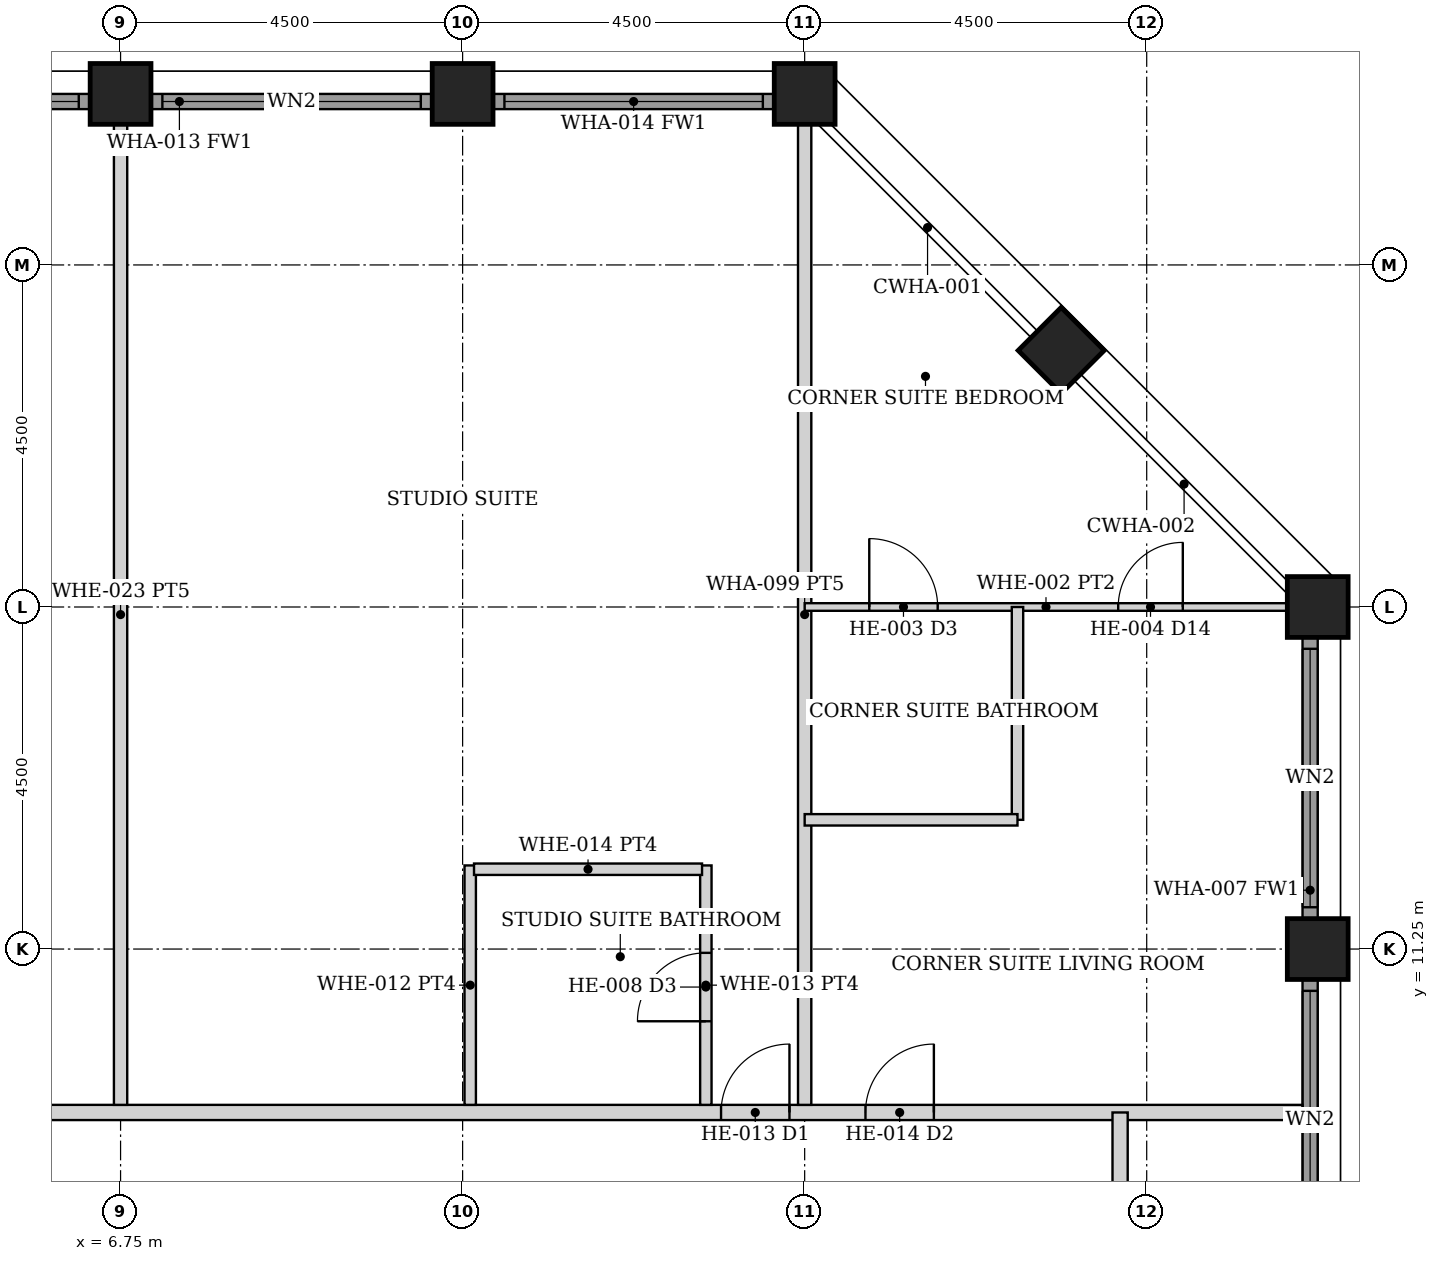
"""IFC4 building model, lengths in metres.
Left out: names, types, materials, properties, quantities, classifications, styles, units other than length and angle.
Written with IfcOpenShell. Run it as: python <this file> out.ifc"""

import sys

from ifc_helpers import new_model, si_unit, direction, frame, frame_2d, origin, origin_2d, place, context, subcontext, project, spatial, rectangle, hollow_rectangle, extrude, element, fill, save


model = new_model("IFC4")
c1 = context("Model", 3, precision=1e-05, world=origin(), true_north=direction((0.0, 1.0)))
c2 = subcontext(c1, "Body", "Model", "MODEL_VIEW")
j1 = project(units=[si_unit("LENGTHUNIT", "METRE"), si_unit("PLANEANGLEUNIT", "RADIAN")], contexts=[c1])
p1 = place(None, origin())
s1 = spatial("IfcSite", under=j1, at=p1, CompositionType="ELEMENT")
p2 = place(p1, origin())
s2 = spatial("IfcBuilding", under=s1, at=p2, CompositionType="ELEMENT")
p3 = place(p2, frame((0.0, 0.0, 161.6)))
s3 = spatial("IfcBuildingStorey", under=s2, at=p3, CompositionType="ELEMENT", Elevation=161.6)
for number, where, z_axis, x_axis in (
    (1, (6.75, 22.5, 0.0), (0.0, 0.0, 1.0), (0.0, 1.0, 0.0)),
    (2, (11.25, 22.5, 0.0), (0.0, 0.0, 1.0), (0.0, 1.0, 0.0)),
    (3, (22.5, 11.25, 0.0), (0.0, 0.0, 1.0), (1.0, 0.0, 0.0)),
    (4, (15.75, 22.5, 0.0), (0.0, 0.0, 1.0), (0.0, 1.0, 0.0)),
    (5, (22.5, 15.75, 0.0), (0.0, 0.0, 1.0), (1.0, 0.0, 0.0)),
    (6, (19.125, 19.125, 0.0), (0.0, 0.0, 1.0), (0.707, 0.707, 0.0)),
):
    element("IfcColumn", number, at=place(p3, frame(where, z_axis=z_axis, x_axis=x_axis)), inside=s3, PredefinedType="COLUMN", context=c2, shape_type="SweptSolid", body=[
        extrude(hollow_rectangle(XDim=0.8, YDim=0.8, WallThickness=0.05, at=origin_2d()), origin(), (0.0, 0.0, 1.0), 3.6),
    ])
p4 = place(p3, frame((22.4, 7.155, 0.0), z_axis=(0.0, 0.0, 1.0), x_axis=(0.0, 1.0, 0.0)))
e7 = element("IfcWall", 7, at=p4, inside=s3, PredefinedType="SOLIDWALL", context=c2, shape_type="SweptSolid", body=[
    extrude(rectangle(XDim=3.69, YDim=0.2, at=frame_2d((1.845, 0.0))), origin(), (0.0, 0.0, 1.0), 2.479),
])
p5 = place(p4, frame((0.145, 0.0, 0.3)))
e8 = element("IfcOpeningElement", 8, at=p5, cuts=e7, PredefinedType="OPENING", context=c2, shape_type="SweptSolid", body=[
    extrude(rectangle(XDim=3.4, YDim=2.029, at=frame_2d((1.7, 1.015))), frame((0.0, 0.11, 0.0), z_axis=(0.0, -1.0, 0.0), x_axis=(1.0, 0.0, 0.0)), (0.0, 0.0, 1.0), 0.22),
])
p6 = place(p3, frame((22.4, 11.655, 0.0), z_axis=(0.0, 0.0, 1.0), x_axis=(0.0, 1.0, 0.0)))
e9 = element("IfcWall", 9, at=p6, inside=s3, PredefinedType="SOLIDWALL", context=c2, shape_type="SweptSolid", body=[
    extrude(rectangle(XDim=3.69, YDim=0.2, at=frame_2d((1.845, 0.0))), origin(), (0.0, 0.0, 1.0), 2.479),
])
p7 = place(p6, frame((0.145, 0.0, 0.3)))
e10 = element("IfcOpeningElement", 10, at=p7, cuts=e9, PredefinedType="OPENING", context=c2, shape_type="SweptSolid", body=[
    extrude(rectangle(XDim=3.4, YDim=2.029, at=frame_2d((1.7, 1.015))), frame((0.0, 0.11, 0.0), z_axis=(0.0, -1.0, 0.0), x_axis=(1.0, 0.0, 0.0)), (0.0, 0.0, 1.0), 0.22),
])
p8 = place(p3, frame((2.655, 22.4, 0.0), z_axis=(0.0, 0.0, 1.0), x_axis=(1.0, 0.0, 0.0)))
e11 = element("IfcWall", 11, at=p8, inside=s3, PredefinedType="SOLIDWALL", context=c2, shape_type="SweptSolid", body=[
    extrude(rectangle(XDim=3.69, YDim=0.2, at=frame_2d((1.845, 0.0))), origin(), (0.0, 0.0, 1.0), 2.479),
])
p9 = place(p8, frame((0.145, 0.0, 0.3)))
e12 = element("IfcOpeningElement", 12, at=p9, cuts=e11, PredefinedType="OPENING", context=c2, shape_type="SweptSolid", body=[
    extrude(rectangle(XDim=3.4, YDim=2.029, at=frame_2d((1.7, 1.015))), frame((0.0, 0.11, 0.0), z_axis=(0.0, -1.0, 0.0), x_axis=(1.0, 0.0, 0.0)), (0.0, 0.0, 1.0), 0.22),
])
p10 = place(p3, frame((7.155, 22.4, 0.0), z_axis=(0.0, 0.0, 1.0), x_axis=(1.0, 0.0, 0.0)))
e13 = element("IfcWall", 13, at=p10, inside=s3, PredefinedType="SOLIDWALL", context=c2, shape_type="SweptSolid", body=[
    extrude(rectangle(XDim=3.69, YDim=0.2, at=frame_2d((1.845, 0.0))), origin(), (0.0, 0.0, 1.0), 2.479),
])
p11 = place(p10, frame((0.145, 0.0, 0.3)))
e14 = element("IfcOpeningElement", 14, at=p11, cuts=e13, PredefinedType="OPENING", context=c2, shape_type="SweptSolid", body=[
    extrude(rectangle(XDim=3.4, YDim=2.029, at=frame_2d((1.7, 1.015))), frame((0.0, 0.11, 0.0), z_axis=(0.0, -1.0, 0.0), x_axis=(1.0, 0.0, 0.0)), (0.0, 0.0, 1.0), 0.22),
])
p12 = place(p3, frame((11.655, 22.4, 0.0), z_axis=(0.0, 0.0, 1.0), x_axis=(1.0, 0.0, 0.0)))
e15 = element("IfcWall", 15, at=p12, inside=s3, PredefinedType="SOLIDWALL", context=c2, shape_type="SweptSolid", body=[
    extrude(rectangle(XDim=3.69, YDim=0.2, at=frame_2d((1.845, 0.0))), origin(), (0.0, 0.0, 1.0), 2.479),
])
p13 = place(p12, frame((0.145, 0.0, 0.3)))
e16 = element("IfcOpeningElement", 16, at=p13, cuts=e15, PredefinedType="OPENING", context=c2, shape_type="SweptSolid", body=[
    extrude(rectangle(XDim=3.4, YDim=2.029, at=frame_2d((1.7, 1.015))), frame((0.0, 0.11, 0.0), z_axis=(0.0, -1.0, 0.0), x_axis=(1.0, 0.0, 0.0)), (0.0, 0.0, 1.0), 0.22),
])
p14 = place(p3, frame((-22.3, 9.1, 0.0), z_axis=(0.0, 0.0, 1.0), x_axis=(1.0, 0.0, 0.0)))
e17 = element("IfcWall", 17, at=p14, inside=s3, PredefinedType="PARTITIONING", context=c2, shape_type="SweptSolid", body=[
    extrude(rectangle(XDim=44.6, YDim=0.2, at=frame_2d((22.3, 0.0))), origin(), (0.0, 0.0, 1.0), 2.473),
])
p15 = place(p14, frame((6.75, 0.0, 0.0)))
e18 = element("IfcOpeningElement", 18, at=p15, cuts=e17, PredefinedType="OPENING", context=c2, shape_type="SweptSolid", body=[
    extrude(rectangle(XDim=0.9, YDim=2.1, at=frame_2d((0.45, 1.05))), frame((0.0, 0.11, 0.0), z_axis=(0.0, -1.0, 0.0), x_axis=(1.0, 0.0, 0.0)), (0.0, 0.0, 1.0), 0.22),
])
p16 = place(p14, frame((15.75, 0.0, 0.0)))
e19 = element("IfcOpeningElement", 19, at=p16, cuts=e17, PredefinedType="OPENING", context=c2, shape_type="SweptSolid", body=[
    extrude(rectangle(XDim=0.9, YDim=2.1, at=frame_2d((0.45, 1.05))), frame((0.0, 0.11, 0.0), z_axis=(0.0, -1.0, 0.0), x_axis=(1.0, 0.0, 0.0)), (0.0, 0.0, 1.0), 0.22),
])
p17 = place(p14, frame((20.25, 0.0, 0.0)))
e20 = element("IfcOpeningElement", 20, at=p17, cuts=e17, PredefinedType="OPENING", context=c2, shape_type="SweptSolid", body=[
    extrude(rectangle(XDim=0.9, YDim=2.1, at=frame_2d((0.45, 1.05))), frame((0.0, 0.11, 0.0), z_axis=(0.0, -1.0, 0.0), x_axis=(1.0, 0.0, 0.0)), (0.0, 0.0, 1.0), 0.22),
])
p18 = place(p14, frame((36.95, 0.0, 0.0)))
e21 = element("IfcOpeningElement", 21, at=p18, cuts=e17, PredefinedType="OPENING", context=c2, shape_type="SweptSolid", body=[
    extrude(rectangle(XDim=0.9, YDim=2.1, at=frame_2d((0.45, 1.05))), frame((0.0, 0.11, 0.0), z_axis=(0.0, -1.0, 0.0), x_axis=(1.0, 0.0, 0.0)), (0.0, 0.0, 1.0), 0.22),
])
p19 = place(p14, frame((38.85, 0.0, 0.0)))
e22 = element("IfcOpeningElement", 22, at=p19, cuts=e17, PredefinedType="OPENING", context=c2, shape_type="SweptSolid", body=[
    extrude(rectangle(XDim=0.9, YDim=2.1, at=frame_2d((0.45, 1.05))), frame((0.0, 0.11, 0.0), z_axis=(0.0, -1.0, 0.0), x_axis=(1.0, 0.0, 0.0)), (0.0, 0.0, 1.0), 0.22),
])
p20 = place(p14, frame((4.85, 0.0, 0.0)))
e23 = element("IfcOpeningElement", 23, at=p20, cuts=e17, PredefinedType="OPENING", context=c2, shape_type="SweptSolid", body=[
    extrude(rectangle(XDim=0.9, YDim=2.1, at=frame_2d((0.45, 1.05))), frame((0.0, 0.11, 0.0), z_axis=(0.0, -1.0, 0.0), x_axis=(1.0, 0.0, 0.0)), (0.0, 0.0, 1.0), 0.22),
])
p21 = place(p3, frame((19.9, -9.1, 0.0), z_axis=(0.0, 0.0, 1.0), x_axis=(0.0, 1.0, 0.0)))
e24 = element("IfcWall", 24, at=p21, inside=s3, PredefinedType="PARTITIONING", context=c2, shape_type="SweptSolid", body=[
    extrude(rectangle(XDim=18.2, YDim=0.2, at=frame_2d((9.1, 0.0))), origin(), (0.0, 0.0, 1.0), 2.473),
])
p22 = place(p21, frame((8.425, 0.0, 0.0)))
e25 = element("IfcOpeningElement", 25, at=p22, cuts=e24, PredefinedType="OPENING", context=c2, shape_type="SweptSolid", body=[
    extrude(rectangle(XDim=1.35, YDim=2.1, at=frame_2d((0.675, 1.05))), frame((0.0, 0.11, 0.0), z_axis=(0.0, -1.0, 0.0), x_axis=(1.0, 0.0, 0.0)), (0.0, 0.0, 1.0), 0.22),
])
p23 = place(p3, frame((14.45, 9.2, 0.0), z_axis=(0.0, 0.0, 1.0), x_axis=(0.0, 1.0, 0.0)))
e26 = element("IfcWall", 26, at=p23, inside=s3, PredefinedType="PARTITIONING", context=c2, shape_type="SweptSolid", body=[
    extrude(rectangle(XDim=3.15, YDim=0.15, at=frame_2d((1.575, 0.0))), origin(), (0.0, 0.0, 1.0), 2.473),
])
p24 = place(p23, frame((1.1, 0.0, 0.0)))
e27 = element("IfcOpeningElement", 27, at=p24, cuts=e26, PredefinedType="OPENING", context=c2, shape_type="SweptSolid", body=[
    extrude(rectangle(XDim=0.9, YDim=2.1, at=frame_2d((0.45, 1.05))), frame((0.0, 0.085, 0.0), z_axis=(0.0, -1.0, 0.0), x_axis=(1.0, 0.0, 0.0)), (0.0, 0.0, 1.0), 0.17),
])
p25 = place(p3, frame((11.35, 9.2, 0.0), z_axis=(0.0, 0.0, 1.0), x_axis=(0.0, 1.0, 0.0)))
e28 = element("IfcWall", 28, at=p25, inside=s3, PredefinedType="PARTITIONING", context=c2, shape_type="SweptSolid", body=[
    extrude(rectangle(XDim=3.15, YDim=0.15, at=frame_2d((1.575, 0.0))), origin(), (0.0, 0.0, 1.0), 2.473),
])
p26 = place(p3, frame((11.4, 12.3, 0.0), z_axis=(0.0, 0.0, 1.0), x_axis=(1.0, 0.0, 0.0)))
e29 = element("IfcWall", 29, at=p26, inside=s3, PredefinedType="PARTITIONING", context=c2, shape_type="SweptSolid", body=[
    extrude(rectangle(XDim=3.0, YDim=0.15, at=frame_2d((1.5, 0.0))), origin(), (0.0, 0.0, 1.0), 2.473),
])
for number, where, z_axis, x_axis in (
    (30, (6.75, 9.2, 0.0), (0.0, 0.0, 1.0), (0.0, 1.0, 0.0)),
    (31, (15.75, 9.2, 0.0), (0.0, 0.0, 1.0), (0.0, 1.0, 0.0)),
):
    element("IfcWall", number, at=place(p3, frame(where, z_axis=z_axis, x_axis=x_axis)), inside=s3, PredefinedType="PARTITIONING", context=c2, shape_type="SweptSolid", body=[
        extrude(rectangle(XDim=12.9, YDim=0.175, at=frame_2d((6.45, 0.0))), origin(), (0.0, 0.0, 1.0), 2.473),
    ])
p27 = place(p3, frame((15.75, 15.75, 0.0), z_axis=(0.0, 0.0, 1.0), x_axis=(1.0, 0.0, 0.0)))
e32 = element("IfcWall", 32, at=p27, inside=s3, PredefinedType="PARTITIONING", context=c2, shape_type="SweptSolid", body=[
    extrude(rectangle(XDim=6.35, YDim=0.1, at=frame_2d((3.175, 0.0))), origin(), (0.0, 0.0, 1.0), 2.473),
])
p28 = place(p27, frame((4.125, 0.0, 0.0)))
e33 = element("IfcOpeningElement", 33, at=p28, cuts=e32, PredefinedType="OPENING", context=c2, shape_type="SweptSolid", body=[
    extrude(rectangle(XDim=0.85, YDim=2.1, at=frame_2d((0.425, 1.05))), frame((0.0, 0.06, 0.0), z_axis=(0.0, -1.0, 0.0), x_axis=(1.0, 0.0, 0.0)), (0.0, 0.0, 1.0), 0.12),
])
p29 = place(p27, frame((0.85, 0.0, 0.0)))
e34 = element("IfcOpeningElement", 34, at=p29, cuts=e32, PredefinedType="OPENING", context=c2, shape_type="SweptSolid", body=[
    extrude(rectangle(XDim=0.9, YDim=2.1, at=frame_2d((0.45, 1.05))), frame((0.0, 0.06, 0.0), z_axis=(0.0, -1.0, 0.0), x_axis=(1.0, 0.0, 0.0)), (0.0, 0.0, 1.0), 0.12),
])
for number, where, z_axis, x_axis in (
    (35, (18.55, 12.95, 0.0), (0.0, 0.0, 1.0), (0.0, 1.0, 0.0)),
    (36, (15.75, 12.95, 0.0), (0.0, 0.0, 1.0), (1.0, 0.0, 0.0)),
):
    element("IfcWall", number, at=place(p3, frame(where, z_axis=z_axis, x_axis=x_axis)), inside=s3, PredefinedType="PARTITIONING", context=c2, shape_type="SweptSolid", body=[
        extrude(rectangle(XDim=2.8, YDim=0.15, at=frame_2d((1.4, 0.0))), origin(), (0.0, 0.0, 1.0), 2.473),
    ])
p30 = place(p5, origin())
e37 = element("IfcWindow", 37, at=p30, inside=s3, PartitioningType="SINGLE_PANEL", PredefinedType="WINDOW", context=c2, shape_type="SweptSolid", body=[
    extrude(rectangle(XDim=3.4, YDim=2.029, at=frame_2d((1.7, 1.015))), frame((0.0, 0.03, 0.0), z_axis=(0.0, -1.0, 0.0), x_axis=(1.0, 0.0, 0.0)), (0.0, 0.0, 1.0), 0.06),
])
fill(e8, e37)
p31 = place(p7, origin())
e38 = element("IfcWindow", 38, at=p31, inside=s3, PartitioningType="SINGLE_PANEL", PredefinedType="WINDOW", context=c2, shape_type="SweptSolid", body=[
    extrude(rectangle(XDim=3.4, YDim=2.029, at=frame_2d((1.7, 1.015))), frame((0.0, 0.03, 0.0), z_axis=(0.0, -1.0, 0.0), x_axis=(1.0, 0.0, 0.0)), (0.0, 0.0, 1.0), 0.06),
])
fill(e10, e38)
p32 = place(p9, origin())
e39 = element("IfcWindow", 39, at=p32, inside=s3, PartitioningType="SINGLE_PANEL", PredefinedType="WINDOW", context=c2, shape_type="SweptSolid", body=[
    extrude(rectangle(XDim=3.4, YDim=2.029, at=frame_2d((1.7, 1.015))), frame((0.0, 0.03, 0.0), z_axis=(0.0, -1.0, 0.0), x_axis=(1.0, 0.0, 0.0)), (0.0, 0.0, 1.0), 0.06),
])
fill(e12, e39)
p33 = place(p11, origin())
e40 = element("IfcWindow", 40, at=p33, inside=s3, PartitioningType="SINGLE_PANEL", PredefinedType="WINDOW", context=c2, shape_type="SweptSolid", body=[
    extrude(rectangle(XDim=3.4, YDim=2.029, at=frame_2d((1.7, 1.015))), frame((0.0, 0.03, 0.0), z_axis=(0.0, -1.0, 0.0), x_axis=(1.0, 0.0, 0.0)), (0.0, 0.0, 1.0), 0.06),
])
fill(e14, e40)
p34 = place(p13, origin())
e41 = element("IfcWindow", 41, at=p34, inside=s3, PartitioningType="SINGLE_PANEL", PredefinedType="WINDOW", context=c2, shape_type="SweptSolid", body=[
    extrude(rectangle(XDim=3.4, YDim=2.029, at=frame_2d((1.7, 1.015))), frame((0.0, 0.03, 0.0), z_axis=(0.0, -1.0, 0.0), x_axis=(1.0, 0.0, 0.0)), (0.0, 0.0, 1.0), 0.06),
])
fill(e16, e41)
p35 = place(p18, origin())
e42 = element("IfcDoor", 42, at=p35, inside=s3, OperationType="SINGLE_SWING_RIGHT", PredefinedType="DOOR", context=c2, shape_type="SweptSolid", body=[
    extrude(rectangle(XDim=0.9, YDim=2.1, at=frame_2d((0.45, 1.05))), frame((0.0, 0.025, 0.0), z_axis=(0.0, -1.0, 0.0), x_axis=(1.0, 0.0, 0.0)), (0.0, 0.0, 1.0), 0.05),
])
fill(e21, e42)
p36 = place(p24, origin())
e43 = element("IfcDoor", 43, at=p36, inside=s3, OperationType="SINGLE_SWING_LEFT", PredefinedType="DOOR", context=c2, shape_type="SweptSolid", body=[
    extrude(rectangle(XDim=0.9, YDim=2.1, at=frame_2d((0.45, 1.05))), frame((0.0, 0.025, 0.0), z_axis=(0.0, -1.0, 0.0), x_axis=(1.0, 0.0, 0.0)), (0.0, 0.0, 1.0), 0.05),
])
fill(e27, e43)
p37 = place(p19, origin())
e44 = element("IfcDoor", 44, at=p37, inside=s3, OperationType="SINGLE_SWING_RIGHT", PredefinedType="DOOR", context=c2, shape_type="SweptSolid", body=[
    extrude(rectangle(XDim=0.9, YDim=2.1, at=frame_2d((0.45, 1.05))), frame((0.0, 0.025, 0.0), z_axis=(0.0, -1.0, 0.0), x_axis=(1.0, 0.0, 0.0)), (0.0, 0.0, 1.0), 0.05),
])
fill(e22, e44)
p38 = place(p28, origin())
e45 = element("IfcDoor", 45, at=p38, inside=s3, OperationType="SINGLE_SWING_RIGHT", PredefinedType="DOOR", context=c2, shape_type="SweptSolid", body=[
    extrude(rectangle(XDim=0.85, YDim=2.1, at=frame_2d((0.425, 1.05))), frame((0.0, 0.025, 0.0), z_axis=(0.0, -1.0, 0.0), x_axis=(1.0, 0.0, 0.0)), (0.0, 0.0, 1.0), 0.05),
])
fill(e33, e45)
p39 = place(p29, origin())
e46 = element("IfcDoor", 46, at=p39, inside=s3, OperationType="SINGLE_SWING_LEFT", PredefinedType="DOOR", context=c2, shape_type="SweptSolid", body=[
    extrude(rectangle(XDim=0.9, YDim=2.1, at=frame_2d((0.45, 1.05))), frame((0.0, 0.025, 0.0), z_axis=(0.0, -1.0, 0.0), x_axis=(1.0, 0.0, 0.0)), (0.0, 0.0, 1.0), 0.05),
])
fill(e34, e46)
save(model, sys.argv[1])
